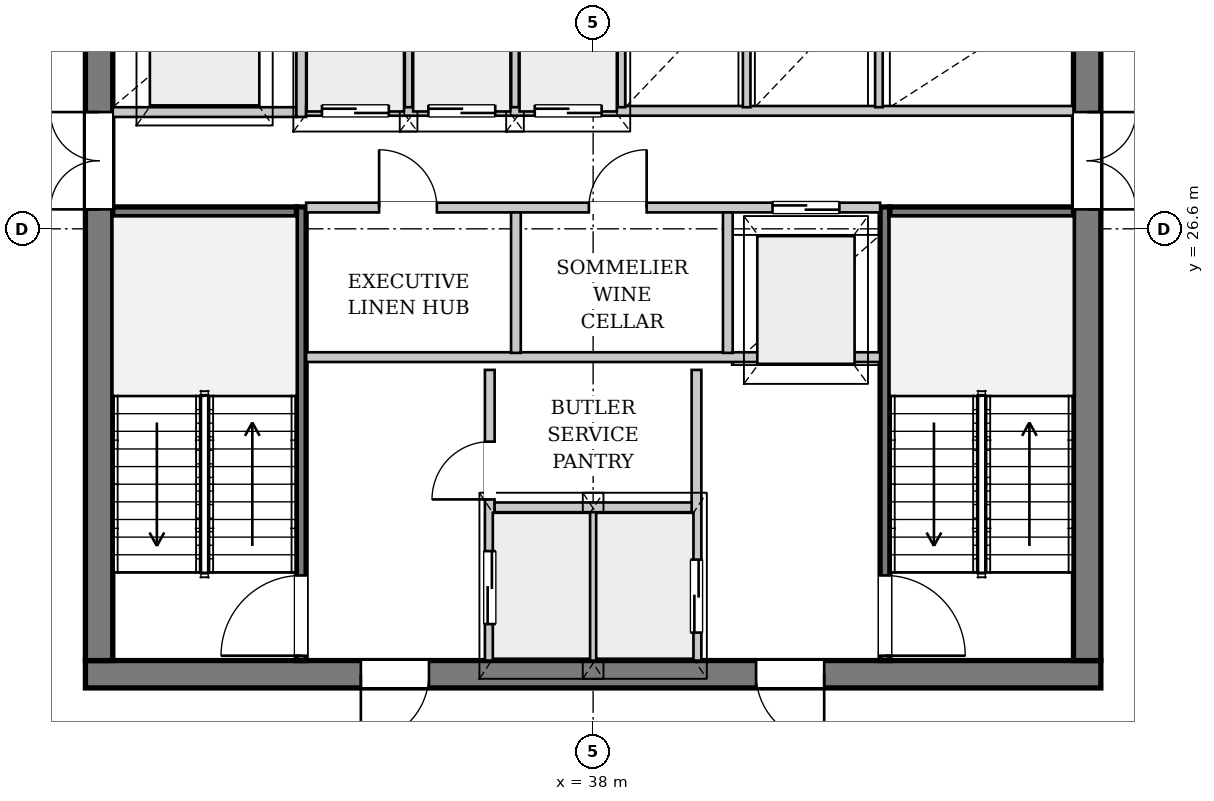
"""IFC4 building model, lengths in metres.
Left out: names, types, materials, properties, quantities, classifications, styles, units other than length and angle.
Written with IfcOpenShell. Run it as: python <this file> out.ifc"""

import sys

from ifc_helpers import new_model, si_unit, direction, frame, frame_2d, origin, place, context, subcontext, project, spatial, rectangle, extrude, source, transform, mapped, element, fill, save


model = new_model("IFC4")
c1 = context("Model", 3, precision=1e-05, world=origin(), true_north=direction((0.0, 1.0)))
c2 = subcontext(c1, "Body", "Model", "MODEL_VIEW")
j1 = project(units=[si_unit("LENGTHUNIT", "METRE"), si_unit("PLANEANGLEUNIT", "RADIAN")], contexts=[c1])
p1 = place(None, origin())
s1 = spatial("IfcSite", under=j1, at=p1, CompositionType="ELEMENT")
p2 = place(p1, origin())
s2 = spatial("IfcBuilding", under=s1, at=p2, CompositionType="ELEMENT")
p3 = place(p2, frame((0.0, 0.0, 227.35)))
s3 = spatial("IfcBuildingStorey", under=s2, at=p3, CompositionType="ELEMENT", Elevation=227.35)
p4 = place(p3, frame((52.76, 24.451, 0.0), z_axis=(0.0, 0.0, 1.0), x_axis=(-0.419378553641, -0.907811449997, 0.0)))
e1 = element("IfcWall", 1, at=p4, inside=s3, PredefinedType="SOLIDWALL", context=c2, shape_type="SweptSolid", body=[
    extrude(rectangle(XDim=22.952, YDim=0.32, at=frame_2d((11.476, 0.0))), origin(), (0.0, 0.0, 1.0), 2.822),
])
p5 = place(p4, frame((6.795, 0.0, 0.0)))
e2 = element("IfcOpeningElement", 2, at=p5, cuts=e1, PredefinedType="OPENING", context=c2, shape_type="SweptSolid", body=[
    extrude(rectangle(XDim=1.5, YDim=2.3, at=frame_2d((0.75, 1.15))), frame((0.0, 0.17, 0.0), z_axis=(0.0, -1.0, 0.0), x_axis=(1.0, 0.0, 0.0)), (0.0, 0.0, 1.0), 0.34),
])
p6 = place(p4, frame((17.285, 0.0, 0.352)))
e3 = element("IfcOpeningElement", 3, at=p6, cuts=e1, PredefinedType="OPENING", context=c2, shape_type="SweptSolid", body=[
    extrude(rectangle(XDim=2.6, YDim=2.35, at=frame_2d((1.3, 1.175))), frame((0.0, 0.17, 0.0), z_axis=(0.0, -1.0, 0.0), x_axis=(1.0, 0.0, 0.0)), (0.0, 0.0, 1.0), 0.34),
])
p7 = place(p3, frame((44.308, 3.919, 0.0), z_axis=(0.0, 0.0, 1.0), x_axis=(0.41441444949, 0.910088272671, 0.0)))
e4 = element("IfcWall", 4, at=p7, inside=s3, PredefinedType="PARAPET", context=c2, shape_type="SweptSolid", body=[
    extrude(rectangle(XDim=20.451, YDim=0.22, at=frame_2d((10.226, 0.0))), origin(), (0.0, 0.0, 1.0), 0.3),
])
p8 = place(p3, frame((46.35, 19.275, 0.0), z_axis=(0.0, 0.0, 1.0), x_axis=(-1.0, 0.0, 0.0)))
e5 = element("IfcWall", 5, at=p8, inside=s3, PredefinedType="SHEAR", context=c2, shape_type="SweptSolid", body=[
    extrude(rectangle(XDim=16.7, YDim=0.45, at=frame_2d((8.35, 0.0))), origin(), (0.0, 0.0, 1.0), 3.33),
])
p9 = place(p8, frame((4.55, 0.0, 0.0)))
e6 = element("IfcOpeningElement", 6, at=p9, cuts=e5, PredefinedType="OPENING", context=c2, shape_type="SweptSolid", body=[
    extrude(rectangle(XDim=1.12, YDim=2.25, at=frame_2d((0.56, 1.125))), frame((0.0, 0.235, 0.0), z_axis=(0.0, -1.0, 0.0), x_axis=(1.0, 0.0, 0.0)), (0.0, 0.0, 1.0), 0.47),
])
p10 = place(p8, frame((11.05, 0.0, 0.0)))
e7 = element("IfcOpeningElement", 7, at=p10, cuts=e5, PredefinedType="OPENING", context=c2, shape_type="SweptSolid", body=[
    extrude(rectangle(XDim=1.12, YDim=2.25, at=frame_2d((0.56, 1.125))), frame((0.0, 0.235, 0.0), z_axis=(0.0, -1.0, 0.0), x_axis=(1.0, 0.0, 0.0)), (0.0, 0.0, 1.0), 0.47),
])
p11 = place(p3, frame((29.875, 19.5, 0.0), z_axis=(0.0, 0.0, 1.0), x_axis=(0.0, 1.0, 0.0)))
e8 = element("IfcWall", 8, at=p11, inside=s3, PredefinedType="SHEAR", context=c2, shape_type="SweptSolid", body=[
    extrude(rectangle(XDim=14.2, YDim=0.45, at=frame_2d((7.1, 0.0))), origin(), (0.0, 0.0, 1.0), 3.33),
])
p12 = place(p11, frame((7.42, 0.0, 0.0)))
e9 = element("IfcOpeningElement", 9, at=p12, cuts=e8, PredefinedType="OPENING", context=c2, shape_type="SweptSolid", body=[
    extrude(rectangle(XDim=1.6, YDim=2.2, at=frame_2d((0.8, 1.1))), frame((0.0, 0.235, 0.0), z_axis=(0.0, -1.0, 0.0), x_axis=(1.0, 0.0, 0.0)), (0.0, 0.0, 1.0), 0.47),
])
p13 = place(p3, frame((46.125, 33.7, 0.0), z_axis=(0.0, 0.0, 1.0), x_axis=(0.0, -1.0, 0.0)))
e10 = element("IfcWall", 10, at=p13, inside=s3, PredefinedType="SHEAR", context=c2, shape_type="SweptSolid", body=[
    extrude(rectangle(XDim=14.2, YDim=0.45, at=frame_2d((7.1, 0.0))), origin(), (0.0, 0.0, 1.0), 3.33),
])
p14 = place(p13, frame((5.18, 0.0, 0.0)))
e11 = element("IfcOpeningElement", 11, at=p14, cuts=e10, PredefinedType="OPENING", context=c2, shape_type="SweptSolid", body=[
    extrude(rectangle(XDim=1.6, YDim=2.2, at=frame_2d((0.8, 1.1))), frame((0.0, 0.235, 0.0), z_axis=(0.0, -1.0, 0.0), x_axis=(1.0, 0.0, 0.0)), (0.0, 0.0, 1.0), 0.47),
])
p15 = place(p13, frame((2.05, 0.0, 0.0)))
e12 = element("IfcOpeningElement", 12, at=p15, cuts=e10, PredefinedType="OPENING", context=c2, shape_type="SweptSolid", body=[
    extrude(rectangle(XDim=0.95, YDim=2.1, at=frame_2d((0.475, 1.05))), frame((0.0, 0.235, 0.0), z_axis=(0.0, -1.0, 0.0), x_axis=(1.0, 0.0, 0.0)), (0.0, 0.0, 1.0), 0.47),
])
p16 = place(p3, frame((33.2, 19.5, 0.0), z_axis=(0.0, 0.0, 1.0), x_axis=(0.0, 1.0, 0.0)))
e13 = element("IfcWall", 13, at=p16, inside=s3, PredefinedType="PARTITIONING", context=c2, shape_type="SweptSolid", body=[
    extrude(rectangle(XDim=7.46, YDim=0.16, at=frame_2d((3.73, 0.0))), origin(), (0.0, 0.0, 1.0), 3.33),
])
p17 = place(p16, frame((0.08, 0.0, 0.0)))
e14 = element("IfcOpeningElement", 14, at=p17, cuts=e13, PredefinedType="OPENING", context=c2, shape_type="SweptSolid", body=[
    extrude(rectangle(XDim=1.32, YDim=2.2, at=frame_2d((0.66, 1.1))), frame((0.0, 0.09, 0.0), z_axis=(0.0, -1.0, 0.0), x_axis=(1.0, 0.0, 0.0)), (0.0, 0.0, 1.0), 0.18),
])
p18 = place(p3, frame((30.1, 26.88, 0.0), z_axis=(0.0, 0.0, 1.0), x_axis=(1.0, 0.0, 0.0)))
e15 = element("IfcWall", 15, at=p18, inside=s3, PredefinedType="PARTITIONING", context=c2, shape_type="SweptSolid", body=[
    extrude(rectangle(XDim=3.02, YDim=0.16, at=frame_2d((1.51, 0.0))), origin(), (0.0, 0.0, 1.0), 3.33),
])
p19 = place(p3, frame((42.8, 26.96, 0.0), z_axis=(0.0, 0.0, 1.0), x_axis=(0.0, -1.0, 0.0)))
e16 = element("IfcWall", 16, at=p19, inside=s3, PredefinedType="PARTITIONING", context=c2, shape_type="SweptSolid", body=[
    extrude(rectangle(XDim=7.46, YDim=0.16, at=frame_2d((3.73, 0.0))), origin(), (0.0, 0.0, 1.0), 3.33),
])
p20 = place(p19, frame((6.06, 0.0, 0.0)))
e17 = element("IfcOpeningElement", 17, at=p20, cuts=e16, PredefinedType="OPENING", context=c2, shape_type="SweptSolid", body=[
    extrude(rectangle(XDim=1.32, YDim=2.2, at=frame_2d((0.66, 1.1))), frame((0.0, 0.09, 0.0), z_axis=(0.0, -1.0, 0.0), x_axis=(1.0, 0.0, 0.0)), (0.0, 0.0, 1.0), 0.18),
])
p21 = place(p3, frame((42.88, 26.88, 0.0), z_axis=(0.0, 0.0, 1.0), x_axis=(1.0, 0.0, 0.0)))
e18 = element("IfcWall", 18, at=p21, inside=s3, PredefinedType="PARTITIONING", context=c2, shape_type="SweptSolid", body=[
    extrude(rectangle(XDim=3.02, YDim=0.16, at=frame_2d((1.51, 0.0))), origin(), (0.0, 0.0, 1.0), 3.33),
])
p22 = place(p3, frame((36.3, 19.5, 0.0), z_axis=(0.0, 0.0, 1.0), x_axis=(0.0, 1.0, 0.0)))
e19 = element("IfcWall", 19, at=p22, inside=s3, PredefinedType="PARTITIONING", context=c2, shape_type="SweptSolid", body=[
    extrude(rectangle(XDim=4.78, YDim=0.16, at=frame_2d((2.39, 0.0))), origin(), (0.0, 0.0, 1.0), 3.33),
])
p23 = place(p22, frame((0.6, 0.0, 0.0)))
e20 = element("IfcOpeningElement", 20, at=p23, cuts=e19, PredefinedType="OPENING", context=c2, shape_type="SweptSolid", body=[
    extrude(rectangle(XDim=1.2, YDim=2.2, at=frame_2d((0.6, 1.1))), frame((0.0, 0.09, 0.0), z_axis=(0.0, -1.0, 0.0), x_axis=(1.0, 0.0, 0.0)), (0.0, 0.0, 1.0), 0.18),
])
p24 = place(p22, frame((2.65, 0.0, 0.0)))
e21 = element("IfcOpeningElement", 21, at=p24, cuts=e19, PredefinedType="OPENING", context=c2, shape_type="SweptSolid", body=[
    extrude(rectangle(XDim=0.95, YDim=2.1, at=frame_2d((0.475, 1.05))), frame((0.0, 0.09, 0.0), z_axis=(0.0, -1.0, 0.0), x_axis=(1.0, 0.0, 0.0)), (0.0, 0.0, 1.0), 0.18),
])
p25 = place(p3, frame((39.7, 24.28, 0.0), z_axis=(0.0, 0.0, 1.0), x_axis=(0.0, -1.0, 0.0)))
e22 = element("IfcWall", 22, at=p25, inside=s3, PredefinedType="PARTITIONING", context=c2, shape_type="SweptSolid", body=[
    extrude(rectangle(XDim=4.78, YDim=0.16, at=frame_2d((2.39, 0.0))), origin(), (0.0, 0.0, 1.0), 3.33),
])
p26 = place(p25, frame((3.12, 0.0, 0.0)))
e23 = element("IfcOpeningElement", 23, at=p26, cuts=e22, PredefinedType="OPENING", context=c2, shape_type="SweptSolid", body=[
    extrude(rectangle(XDim=1.2, YDim=2.2, at=frame_2d((0.6, 1.1))), frame((0.0, 0.09, 0.0), z_axis=(0.0, -1.0, 0.0), x_axis=(1.0, 0.0, 0.0)), (0.0, 0.0, 1.0), 0.18),
])
p27 = place(p3, frame((38.0, 19.5, 0.0), z_axis=(0.0, 0.0, 1.0), x_axis=(0.0, 1.0, 0.0)))
e24 = element("IfcWall", 24, at=p27, inside=s3, PredefinedType="PARTITIONING", context=c2, shape_type="SweptSolid", body=[
    extrude(rectangle(XDim=2.46, YDim=0.125, at=frame_2d((1.23, 0.0))), origin(), (0.0, 0.0, 1.0), 3.33),
])
p28 = place(p3, frame((36.38, 22.02, 0.0), z_axis=(0.0, 0.0, 1.0), x_axis=(1.0, 0.0, 0.0)))
e25 = element("IfcWall", 25, at=p28, inside=s3, PredefinedType="PARTITIONING", context=c2, shape_type="SweptSolid", body=[
    extrude(rectangle(XDim=3.24, YDim=0.16, at=frame_2d((1.62, 0.0))), origin(), (0.0, 0.0, 1.0), 3.33),
])
p29 = place(p3, frame((33.28, 24.49, 0.0), z_axis=(0.0, 0.0, 1.0), x_axis=(1.0, 0.0, 0.0)))
e26 = element("IfcWall", 26, at=p29, inside=s3, PredefinedType="PARTITIONING", context=c2, shape_type="SweptSolid", body=[
    extrude(rectangle(XDim=9.44, YDim=0.16, at=frame_2d((4.72, 0.0))), origin(), (0.0, 0.0, 1.0), 3.33),
])
p30 = place(p3, frame((30.1, 28.52, 0.0), z_axis=(0.0, 0.0, 1.0), x_axis=(1.0, 0.0, 0.0)))
e27 = element("IfcWall", 27, at=p30, inside=s3, PredefinedType="PARTITIONING", context=c2, shape_type="SweptSolid", body=[
    extrude(rectangle(XDim=3.02, YDim=0.16, at=frame_2d((1.51, 0.0))), origin(), (0.0, 0.0, 1.0), 3.33),
])
p31 = place(p3, frame((33.2, 28.44, 0.0), z_axis=(0.0, 0.0, 1.0), x_axis=(0.0, 1.0, 0.0)))
e28 = element("IfcWall", 28, at=p31, inside=s3, PredefinedType="PARTITIONING", context=c2, shape_type="SweptSolid", body=[
    extrude(rectangle(XDim=5.26, YDim=0.16, at=frame_2d((2.63, 0.0))), origin(), (0.0, 0.0, 1.0), 3.33),
])
p32 = place(p3, frame((33.28, 26.95, 0.0), z_axis=(0.0, 0.0, 1.0), x_axis=(1.0, 0.0, 0.0)))
e29 = element("IfcWall", 29, at=p32, inside=s3, PredefinedType="PARTITIONING", context=c2, shape_type="SweptSolid", body=[
    extrude(rectangle(XDim=9.44, YDim=0.16, at=frame_2d((4.72, 0.0))), origin(), (0.0, 0.0, 1.0), 3.33),
])
p33 = place(p32, frame((1.2, 0.0, 0.0)))
e30 = element("IfcOpeningElement", 30, at=p33, cuts=e29, PredefinedType="OPENING", context=c2, shape_type="SweptSolid", body=[
    extrude(rectangle(XDim=0.95, YDim=2.1, at=frame_2d((0.475, 1.05))), frame((0.0, 0.09, 0.0), z_axis=(0.0, -1.0, 0.0), x_axis=(1.0, 0.0, 0.0)), (0.0, 0.0, 1.0), 0.18),
])
p34 = place(p32, frame((4.65, 0.0, 0.0)))
e31 = element("IfcOpeningElement", 31, at=p34, cuts=e29, PredefinedType="OPENING", context=c2, shape_type="SweptSolid", body=[
    extrude(rectangle(XDim=0.95, YDim=2.1, at=frame_2d((0.475, 1.05))), frame((0.0, 0.09, 0.0), z_axis=(0.0, -1.0, 0.0), x_axis=(1.0, 0.0, 0.0)), (0.0, 0.0, 1.0), 0.18),
])
p35 = place(p32, frame((7.67, 0.0, 0.0)))
e32 = element("IfcOpeningElement", 32, at=p35, cuts=e29, PredefinedType="OPENING", context=c2, shape_type="SweptSolid", body=[
    extrude(rectangle(XDim=1.1, YDim=2.2, at=frame_2d((0.55, 1.1))), frame((0.0, 0.09, 0.0), z_axis=(0.0, -1.0, 0.0), x_axis=(1.0, 0.0, 0.0)), (0.0, 0.0, 1.0), 0.18),
])
for number, where, z_axis, x_axis in (
    (33, (36.73, 24.56, 0.0), (0.0, 0.0, 1.0), (0.0, 1.0, 0.0)),
    (34, (40.215, 24.56, 0.0), (0.0, 0.0, 1.0), (0.0, 1.0, 0.0)),
):
    element("IfcWall", number, at=place(p3, frame(where, z_axis=z_axis, x_axis=x_axis)), inside=s3, PredefinedType="PARTITIONING", context=c2, shape_type="SweptSolid", body=[
        extrude(rectangle(XDim=2.31, YDim=0.16, at=frame_2d((1.155, 0.0))), origin(), (0.0, 0.0, 1.0), 3.33),
    ])
p36 = place(p3, frame((33.28, 28.54, 0.0), z_axis=(0.0, 0.0, 1.0), x_axis=(1.0, 0.0, 0.0)))
e35 = element("IfcWall", 35, at=p36, inside=s3, PredefinedType="PARTITIONING", context=c2, shape_type="SweptSolid", body=[
    extrude(rectangle(XDim=12.62, YDim=0.16, at=frame_2d((6.31, 0.0))), origin(), (0.0, 0.0, 1.0), 3.33),
])
p37 = place(p36, frame((0.26, 0.0, 0.0)))
e36 = element("IfcOpeningElement", 36, at=p37, cuts=e35, PredefinedType="OPENING", context=c2, shape_type="SweptSolid", body=[
    extrude(rectangle(XDim=1.1, YDim=2.2, at=frame_2d((0.55, 1.1))), frame((0.0, 0.09, 0.0), z_axis=(0.0, -1.0, 0.0), x_axis=(1.0, 0.0, 0.0)), (0.0, 0.0, 1.0), 0.18),
])
p38 = place(p36, frame((2.01, 0.0, 0.0)))
e37 = element("IfcOpeningElement", 37, at=p38, cuts=e35, PredefinedType="OPENING", context=c2, shape_type="SweptSolid", body=[
    extrude(rectangle(XDim=1.1, YDim=2.2, at=frame_2d((0.55, 1.1))), frame((0.0, 0.09, 0.0), z_axis=(0.0, -1.0, 0.0), x_axis=(1.0, 0.0, 0.0)), (0.0, 0.0, 1.0), 0.18),
])
p39 = place(p36, frame((3.76, 0.0, 0.0)))
e38 = element("IfcOpeningElement", 38, at=p39, cuts=e35, PredefinedType="OPENING", context=c2, shape_type="SweptSolid", body=[
    extrude(rectangle(XDim=1.1, YDim=2.2, at=frame_2d((0.55, 1.1))), frame((0.0, 0.09, 0.0), z_axis=(0.0, -1.0, 0.0), x_axis=(1.0, 0.0, 0.0)), (0.0, 0.0, 1.0), 0.18),
])
for number, where, z_axis, x_axis in (
    (39, (34.965, 28.6, 0.0), (0.0, 0.0, 1.0), (0.0, 1.0, 0.0)),
    (40, (36.715, 28.6, 0.0), (0.0, 0.0, 1.0), (0.0, 1.0, 0.0)),
    (41, (38.465, 28.6, 0.0), (0.0, 0.0, 1.0), (0.0, 1.0, 0.0)),
    (42, (40.525, 28.6, 0.0), (0.0, 0.0, 1.0), (0.0, 1.0, 0.0)),
    (43, (42.7, 28.6, 0.0), (0.0, 0.0, 1.0), (0.0, 1.0, 0.0)),
):
    element("IfcWall", number, at=place(p3, frame(where, z_axis=z_axis, x_axis=x_axis)), inside=s3, PredefinedType="PARTITIONING", context=c2, shape_type="SweptSolid", body=[
        extrude(rectangle(XDim=1.92, YDim=0.125, at=frame_2d((0.96, 0.0))), origin(), (0.0, 0.0, 1.0), 3.33),
    ])
m1 = source(origin(), c2, "Body", "SweptSolid", [
    extrude(rectangle(XDim=1.12, YDim=2.25, at=frame_2d((0.56, 1.125))), frame((0.0, 0.025, 0.0), z_axis=(0.0, -1.0, 0.0), x_axis=(1.0, 0.0, 0.0)), (0.0, 0.0, 1.0), 0.05),
])
p40 = place(p9, origin())
e44 = element("IfcDoor", 44, at=p40, inside=s3, OperationType="SINGLE_SWING_LEFT", PredefinedType="DOOR", context=c2, shape_type="MappedRepresentation", body=[
    mapped(m1, transform((0.0, 0.0, 0.0), x_axis=(1.0, 0.0, 0.0), y_axis=(0.0, 1.0, 0.0), z_axis=(0.0, 0.0, 1.0), scale=1.0)),
])
fill(e6, e44)
p41 = place(p10, origin())
e45 = element("IfcDoor", 45, at=p41, inside=s3, OperationType="SINGLE_SWING_RIGHT", PredefinedType="DOOR", context=c2, shape_type="MappedRepresentation", body=[
    mapped(m1, transform((0.0, 0.0, 0.0), x_axis=(1.0, 0.0, 0.0), y_axis=(0.0, 1.0, 0.0), z_axis=(0.0, 0.0, 1.0), scale=1.0)),
])
fill(e7, e45)
m2 = source(origin(), c2, "Body", "SweptSolid", [
    extrude(rectangle(XDim=1.6, YDim=2.2, at=frame_2d((0.8, 1.1))), frame((0.0, 0.025, 0.0), z_axis=(0.0, -1.0, 0.0), x_axis=(1.0, 0.0, 0.0)), (0.0, 0.0, 1.0), 0.05),
])
p42 = place(p12, origin())
e46 = element("IfcDoor", 46, at=p42, inside=s3, OperationType="DOUBLE_DOOR_SINGLE_SWING", PredefinedType="DOOR", context=c2, shape_type="MappedRepresentation", body=[
    mapped(m2, transform((0.0, 0.0, 0.0), x_axis=(1.0, 0.0, 0.0), y_axis=(0.0, 1.0, 0.0), z_axis=(0.0, 0.0, 1.0), scale=1.0)),
])
fill(e9, e46)
p43 = place(p14, origin())
e47 = element("IfcDoor", 47, at=p43, inside=s3, OperationType="DOUBLE_DOOR_SINGLE_SWING", PredefinedType="DOOR", context=c2, shape_type="MappedRepresentation", body=[
    mapped(m2, transform((0.0, 0.0, 0.0), x_axis=(1.0, 0.0, 0.0), y_axis=(0.0, 1.0, 0.0), z_axis=(0.0, 0.0, 1.0), scale=1.0)),
])
fill(e11, e47)
m3 = source(origin(), c2, "Body", "SweptSolid", [
    extrude(rectangle(XDim=1.32, YDim=2.2, at=frame_2d((0.66, 1.1))), frame((0.0, 0.025, 0.0), z_axis=(0.0, -1.0, 0.0), x_axis=(1.0, 0.0, 0.0)), (0.0, 0.0, 1.0), 0.05),
])
p44 = place(p17, origin())
e48 = element("IfcDoor", 48, at=p44, inside=s3, OperationType="SINGLE_SWING_LEFT", PredefinedType="DOOR", context=c2, shape_type="MappedRepresentation", body=[
    mapped(m3, transform((0.0, 0.0, 0.0), x_axis=(1.0, 0.0, 0.0), y_axis=(0.0, 1.0, 0.0), z_axis=(0.0, 0.0, 1.0), scale=1.0)),
])
fill(e14, e48)
p45 = place(p20, origin())
e49 = element("IfcDoor", 49, at=p45, inside=s3, OperationType="SINGLE_SWING_RIGHT", PredefinedType="DOOR", context=c2, shape_type="MappedRepresentation", body=[
    mapped(m3, transform((0.0, 0.0, 0.0), x_axis=(1.0, 0.0, 0.0), y_axis=(0.0, 1.0, 0.0), z_axis=(0.0, 0.0, 1.0), scale=1.0)),
])
fill(e17, e49)
m4 = source(origin(), c2, "Body", "SweptSolid", [
    extrude(rectangle(XDim=1.2, YDim=2.2, at=frame_2d((0.6, 1.1))), frame((0.0, 0.025, 0.0), z_axis=(0.0, -1.0, 0.0), x_axis=(1.0, 0.0, 0.0)), (0.0, 0.0, 1.0), 0.05),
])
p46 = place(p23, origin())
e50 = element("IfcDoor", 50, at=p46, inside=s3, OperationType="DOUBLE_DOOR_SLIDING", PredefinedType="DOOR", context=c2, shape_type="MappedRepresentation", body=[
    mapped(m4, transform((0.0, 0.0, 0.0), x_axis=(1.0, 0.0, 0.0), y_axis=(0.0, 1.0, 0.0), z_axis=(0.0, 0.0, 1.0), scale=1.0)),
])
fill(e20, e50)
m5 = source(origin(), c2, "Body", "SweptSolid", [
    extrude(rectangle(XDim=0.95, YDim=2.1, at=frame_2d((0.475, 1.05))), frame((0.0, 0.025, 0.0), z_axis=(0.0, -1.0, 0.0), x_axis=(1.0, 0.0, 0.0)), (0.0, 0.0, 1.0), 0.05),
])
p47 = place(p24, origin())
e51 = element("IfcDoor", 51, at=p47, inside=s3, OperationType="SINGLE_SWING_LEFT", PredefinedType="DOOR", context=c2, shape_type="MappedRepresentation", body=[
    mapped(m5, transform((0.0, 0.0, 0.0), x_axis=(1.0, 0.0, 0.0), y_axis=(0.0, 1.0, 0.0), z_axis=(0.0, 0.0, 1.0), scale=1.0)),
])
fill(e21, e51)
p48 = place(p26, origin())
e52 = element("IfcDoor", 52, at=p48, inside=s3, OperationType="DOUBLE_DOOR_SLIDING", PredefinedType="DOOR", context=c2, shape_type="MappedRepresentation", body=[
    mapped(m4, transform((0.0, 0.0, 0.0), x_axis=(1.0, 0.0, 0.0), y_axis=(0.0, 1.0, 0.0), z_axis=(0.0, 0.0, 1.0), scale=1.0)),
])
fill(e23, e52)
p49 = place(p33, origin())
e53 = element("IfcDoor", 53, at=p49, inside=s3, OperationType="SINGLE_SWING_LEFT", PredefinedType="DOOR", context=c2, shape_type="MappedRepresentation", body=[
    mapped(m5, transform((0.0, 0.0, 0.0), x_axis=(1.0, 0.0, 0.0), y_axis=(0.0, 1.0, 0.0), z_axis=(0.0, 0.0, 1.0), scale=1.0)),
])
fill(e30, e53)
p50 = place(p34, origin())
e54 = element("IfcDoor", 54, at=p50, inside=s3, OperationType="SINGLE_SWING_RIGHT", PredefinedType="DOOR", context=c2, shape_type="MappedRepresentation", body=[
    mapped(m5, transform((0.0, 0.0, 0.0), x_axis=(1.0, 0.0, 0.0), y_axis=(0.0, 1.0, 0.0), z_axis=(0.0, 0.0, 1.0), scale=1.0)),
])
fill(e31, e54)
m6 = source(origin(), c2, "Body", "SweptSolid", [
    extrude(rectangle(XDim=1.1, YDim=2.2, at=frame_2d((0.55, 1.1))), frame((0.0, 0.025, 0.0), z_axis=(0.0, -1.0, 0.0), x_axis=(1.0, 0.0, 0.0)), (0.0, 0.0, 1.0), 0.05),
])
p51 = place(p35, origin())
e55 = element("IfcDoor", 55, at=p51, inside=s3, OperationType="DOUBLE_DOOR_SLIDING", PredefinedType="DOOR", context=c2, shape_type="MappedRepresentation", body=[
    mapped(m6, transform((0.0, 0.0, 0.0), x_axis=(1.0, 0.0, 0.0), y_axis=(0.0, 1.0, 0.0), z_axis=(0.0, 0.0, 1.0), scale=1.0)),
])
fill(e32, e55)
p52 = place(p37, origin())
e56 = element("IfcDoor", 56, at=p52, inside=s3, OperationType="DOUBLE_DOOR_SLIDING", PredefinedType="DOOR", context=c2, shape_type="MappedRepresentation", body=[
    mapped(m6, transform((0.0, 0.0, 0.0), x_axis=(1.0, 0.0, 0.0), y_axis=(0.0, 1.0, 0.0), z_axis=(0.0, 0.0, 1.0), scale=1.0)),
])
fill(e36, e56)
p53 = place(p38, origin())
e57 = element("IfcDoor", 57, at=p53, inside=s3, OperationType="DOUBLE_DOOR_SLIDING", PredefinedType="DOOR", context=c2, shape_type="MappedRepresentation", body=[
    mapped(m6, transform((0.0, 0.0, 0.0), x_axis=(1.0, 0.0, 0.0), y_axis=(0.0, 1.0, 0.0), z_axis=(0.0, 0.0, 1.0), scale=1.0)),
])
fill(e37, e57)
p54 = place(p39, origin())
e58 = element("IfcDoor", 58, at=p54, inside=s3, OperationType="DOUBLE_DOOR_SLIDING", PredefinedType="DOOR", context=c2, shape_type="MappedRepresentation", body=[
    mapped(m6, transform((0.0, 0.0, 0.0), x_axis=(1.0, 0.0, 0.0), y_axis=(0.0, 1.0, 0.0), z_axis=(0.0, 0.0, 1.0), scale=1.0)),
])
fill(e38, e58)
save(model, sys.argv[1])
